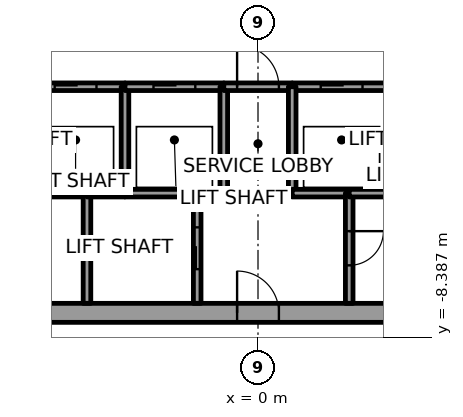
"""IFC4 building model, lengths in metres.
Left out: names, types, materials, properties, quantities, classifications, styles, units other than length and angle.
Written with IfcOpenShell. Run it as: python <this file> out.ifc"""

import sys

from ifc_helpers import new_model, si_unit, direction, frame, frame_2d, origin, place, context, subcontext, project, spatial, rectangle, extrude, element, fill, save


model = new_model("IFC4")
c1 = context("Model", 3, precision=1e-05, world=origin(), true_north=direction((0.0, 1.0)))
c2 = subcontext(c1, "Body", "Model", "MODEL_VIEW")
j1 = project(units=[si_unit("LENGTHUNIT", "METRE"), si_unit("PLANEANGLEUNIT", "RADIAN")], contexts=[c1])
p1 = place(None, origin())
s1 = spatial("IfcSite", under=j1, at=p1, CompositionType="ELEMENT")
p2 = place(p1, origin())
s2 = spatial("IfcBuilding", under=s1, at=p2, CompositionType="ELEMENT")
p3 = place(p2, frame((0.0, 0.0, 181.8)))
s3 = spatial("IfcBuildingStorey", under=s2, at=p3, CompositionType="ELEMENT", Elevation=181.8)
p4 = place(p3, frame((-11.0, -7.75, 0.0), z_axis=(0.0, 0.0, 1.0), x_axis=(1.0, 0.0, 0.0)))
e1 = element("IfcWall", 1, at=p4, inside=s3, PredefinedType="SHEAR", context=c2, shape_type="SweptSolid", body=[
    extrude(rectangle(XDim=22.0, YDim=0.5, at=frame_2d((11.0, 0.0))), origin(), (0.0, 0.0, 1.0), 4.0),
])
p5 = place(p4, frame((10.45, 0.0, 0.0)))
e2 = element("IfcOpeningElement", 2, at=p5, cuts=e1, PredefinedType="OPENING", context=c2, shape_type="SweptSolid", body=[
    extrude(rectangle(XDim=1.1, YDim=2.1, at=frame_2d((0.55, 1.05))), frame((0.0, 0.25, 0.0), z_axis=(0.0, -1.0, 0.0), x_axis=(1.0, 0.0, 0.0)), (0.0, 0.0, 1.0), 0.5),
])
p6 = place(p3, frame((-6.1, -4.6, 0.0), z_axis=(0.0, 0.0, 1.0), x_axis=(1.0, 0.0, 0.0)))
e3 = element("IfcWall", 3, at=p6, inside=s3, PredefinedType="SOLIDWALL", context=c2, shape_type="SweptSolid", body=[
    extrude(rectangle(XDim=1.6, YDim=0.2, at=frame_2d((0.8, 0.0))), origin(), (0.0, 0.0, 1.0), 3.85),
])
p7 = place(p3, frame((-6.1, -1.8, 0.0), z_axis=(0.0, 0.0, 1.0), x_axis=(1.0, 0.0, 0.0)))
e4 = element("IfcWall", 4, at=p7, inside=s3, PredefinedType="SOLIDWALL", context=c2, shape_type="SweptSolid", body=[
    extrude(rectangle(XDim=2.6, YDim=0.2, at=frame_2d((1.3, 0.0))), origin(), (0.0, 0.0, 1.0), 3.85),
])
p8 = place(p7, frame((0.75, 0.0, 0.0)))
e5 = element("IfcOpeningElement", 5, at=p8, cuts=e4, PredefinedType="OPENING", context=c2, shape_type="SweptSolid", body=[
    extrude(rectangle(XDim=1.1, YDim=2.1, at=frame_2d((0.55, 1.05))), frame((0.0, 0.1, 0.0), z_axis=(0.0, -1.0, 0.0), x_axis=(1.0, 0.0, 0.0)), (0.0, 0.0, 1.0), 0.2),
])
p9 = place(p3, frame((-4.5, -4.6, 0.0), z_axis=(0.0, 0.0, 1.0), x_axis=(0.0, -1.0, 0.0)))
e6 = element("IfcWall", 6, at=p9, inside=s3, PredefinedType="SOLIDWALL", context=c2, shape_type="SweptSolid", body=[
    extrude(rectangle(XDim=2.9, YDim=0.2, at=frame_2d((1.45, 0.0))), origin(), (0.0, 0.0, 1.0), 3.85),
])
p10 = place(p3, frame((-4.5, -4.6, 0.0), z_axis=(0.0, 0.0, 1.0), x_axis=(1.0, 0.0, 0.0)))
e7 = element("IfcWall", 7, at=p10, inside=s3, PredefinedType="SOLIDWALL", context=c2, shape_type="SweptSolid", body=[
    extrude(rectangle(XDim=1.0, YDim=0.2, at=frame_2d((0.5, 0.0))), origin(), (0.0, 0.0, 1.0), 3.85),
])
p11 = place(p3, frame((-3.5, -4.6, 0.0), z_axis=(0.0, 0.0, 1.0), x_axis=(1.0, 0.0, 0.0)))
e8 = element("IfcWall", 8, at=p11, inside=s3, PredefinedType="SOLIDWALL", context=c2, shape_type="SweptSolid", body=[
    extrude(rectangle(XDim=1.9, YDim=0.2, at=frame_2d((0.95, 0.0))), origin(), (0.0, 0.0, 1.0), 3.85),
])
p12 = place(p3, frame((-3.5, -4.6, 0.0), z_axis=(0.0, 0.0, 1.0), x_axis=(0.0, 1.0, 0.0)))
e9 = element("IfcWall", 9, at=p12, inside=s3, PredefinedType="SOLIDWALL", context=c2, shape_type="SweptSolid", body=[
    extrude(rectangle(XDim=2.8, YDim=0.2, at=frame_2d((1.4, 0.0))), origin(), (0.0, 0.0, 1.0), 3.85),
])
p13 = place(p3, frame((-3.5, -1.8, 0.0), z_axis=(0.0, 0.0, 1.0), x_axis=(1.0, 0.0, 0.0)))
e10 = element("IfcWall", 10, at=p13, inside=s3, PredefinedType="SOLIDWALL", context=c2, shape_type="SweptSolid", body=[
    extrude(rectangle(XDim=2.6, YDim=0.2, at=frame_2d((1.3, 0.0))), origin(), (0.0, 0.0, 1.0), 3.85),
])
p14 = place(p13, frame((0.75, 0.0, 0.0)))
e11 = element("IfcOpeningElement", 11, at=p14, cuts=e10, PredefinedType="OPENING", context=c2, shape_type="SweptSolid", body=[
    extrude(rectangle(XDim=1.1, YDim=2.1, at=frame_2d((0.55, 1.05))), frame((0.0, 0.1, 0.0), z_axis=(0.0, -1.0, 0.0), x_axis=(1.0, 0.0, 0.0)), (0.0, 0.0, 1.0), 0.2),
])
p15 = place(p3, frame((-1.6, -7.5, 0.0), z_axis=(0.0, 0.0, 1.0), x_axis=(0.0, 1.0, 0.0)))
e12 = element("IfcWall", 12, at=p15, inside=s3, PredefinedType="SOLIDWALL", context=c2, shape_type="SweptSolid", body=[
    extrude(rectangle(XDim=2.9, YDim=0.2, at=frame_2d((1.45, 0.0))), origin(), (0.0, 0.0, 1.0), 3.85),
])
p16 = place(p15, frame((0.9, 0.0, 0.0)))
e13 = element("IfcOpeningElement", 13, at=p16, cuts=e12, PredefinedType="OPENING", context=c2, shape_type="SweptSolid", body=[
    extrude(rectangle(XDim=1.1, YDim=2.1, at=frame_2d((0.55, 1.05))), frame((0.0, 0.1, 0.0), z_axis=(0.0, -1.0, 0.0), x_axis=(1.0, 0.0, 0.0)), (0.0, 0.0, 1.0), 0.2),
])
p17 = place(p3, frame((-1.6, -4.6, 0.0), z_axis=(0.0, 0.0, 1.0), x_axis=(1.0, 0.0, 0.0)))
e14 = element("IfcWall", 14, at=p17, inside=s3, PredefinedType="SOLIDWALL", context=c2, shape_type="SweptSolid", body=[
    extrude(rectangle(XDim=0.7, YDim=0.2, at=frame_2d((0.35, 0.0))), origin(), (0.0, 0.0, 1.0), 3.85),
])
p18 = place(p3, frame((-0.9, -4.6, 0.0), z_axis=(0.0, 0.0, 1.0), x_axis=(0.0, 1.0, 0.0)))
e15 = element("IfcWall", 15, at=p18, inside=s3, PredefinedType="SOLIDWALL", context=c2, shape_type="SweptSolid", body=[
    extrude(rectangle(XDim=2.8, YDim=0.2, at=frame_2d((1.4, 0.0))), origin(), (0.0, 0.0, 1.0), 3.85),
])
p19 = place(p3, frame((-0.9, -1.8, 0.0), z_axis=(0.0, 0.0, 1.0), x_axis=(1.0, 0.0, 0.0)))
e16 = element("IfcWall", 16, at=p19, inside=s3, PredefinedType="SOLIDWALL", context=c2, shape_type="SweptSolid", body=[
    extrude(rectangle(XDim=1.8, YDim=0.2, at=frame_2d((0.9, 0.0))), origin(), (0.0, 0.0, 1.0), 3.85),
])
p20 = place(p19, frame((0.35, 0.0, 0.0)))
e17 = element("IfcOpeningElement", 17, at=p20, cuts=e16, PredefinedType="OPENING", context=c2, shape_type="SweptSolid", body=[
    extrude(rectangle(XDim=1.1, YDim=2.1, at=frame_2d((0.55, 1.05))), frame((0.0, 0.1, 0.0), z_axis=(0.0, -1.0, 0.0), x_axis=(1.0, 0.0, 0.0)), (0.0, 0.0, 1.0), 0.2),
])
p21 = place(p3, frame((0.9, -1.8, 0.0), z_axis=(0.0, 0.0, 1.0), x_axis=(1.0, 0.0, 0.0)))
e18 = element("IfcWall", 18, at=p21, inside=s3, PredefinedType="SOLIDWALL", context=c2, shape_type="SweptSolid", body=[
    extrude(rectangle(XDim=2.6, YDim=0.2, at=frame_2d((1.3, 0.0))), origin(), (0.0, 0.0, 1.0), 3.85),
])
p22 = place(p21, frame((0.75, 0.0, 0.0)))
e19 = element("IfcOpeningElement", 19, at=p22, cuts=e18, PredefinedType="OPENING", context=c2, shape_type="SweptSolid", body=[
    extrude(rectangle(XDim=1.1, YDim=2.1, at=frame_2d((0.55, 1.05))), frame((0.0, 0.1, 0.0), z_axis=(0.0, -1.0, 0.0), x_axis=(1.0, 0.0, 0.0)), (0.0, 0.0, 1.0), 0.2),
])
p23 = place(p3, frame((0.9, -1.8, 0.0), z_axis=(0.0, 0.0, 1.0), x_axis=(0.0, -1.0, 0.0)))
e20 = element("IfcWall", 20, at=p23, inside=s3, PredefinedType="SOLIDWALL", context=c2, shape_type="SweptSolid", body=[
    extrude(rectangle(XDim=2.8, YDim=0.2, at=frame_2d((1.4, 0.0))), origin(), (0.0, 0.0, 1.0), 3.85),
])
p24 = place(p3, frame((0.9, -4.6, 0.0), z_axis=(0.0, 0.0, 1.0), x_axis=(1.0, 0.0, 0.0)))
e21 = element("IfcWall", 21, at=p24, inside=s3, PredefinedType="SOLIDWALL", context=c2, shape_type="SweptSolid", body=[
    extrude(rectangle(XDim=1.5, YDim=0.2, at=frame_2d((0.75, 0.0))), origin(), (0.0, 0.0, 1.0), 3.85),
])
p25 = place(p3, frame((2.4, -4.6, 0.0), z_axis=(0.0, 0.0, 1.0), x_axis=(0.0, -1.0, 0.0)))
e22 = element("IfcWall", 22, at=p25, inside=s3, PredefinedType="SOLIDWALL", context=c2, shape_type="SweptSolid", body=[
    extrude(rectangle(XDim=2.9, YDim=0.2, at=frame_2d((1.45, 0.0))), origin(), (0.0, 0.0, 1.0), 3.85),
])
p26 = place(p25, frame((1.0, 0.0, 0.0)))
e23 = element("IfcOpeningElement", 23, at=p26, cuts=e22, PredefinedType="OPENING", context=c2, shape_type="SweptSolid", body=[
    extrude(rectangle(XDim=0.9, YDim=2.1, at=frame_2d((0.45, 1.05))), frame((0.0, 0.1, 0.0), z_axis=(0.0, -1.0, 0.0), x_axis=(1.0, 0.0, 0.0)), (0.0, 0.0, 1.0), 0.2),
])
p27 = place(p3, frame((3.5, -4.6, 0.0), z_axis=(0.0, 0.0, 1.0), x_axis=(-1.0, 0.0, 0.0)))
e24 = element("IfcWall", 24, at=p27, inside=s3, PredefinedType="SOLIDWALL", context=c2, shape_type="SweptSolid", body=[
    extrude(rectangle(XDim=1.1, YDim=0.2, at=frame_2d((0.55, 0.0))), origin(), (0.0, 0.0, 1.0), 3.85),
])
p28 = place(p8, origin())
e25 = element("IfcDoor", 25, at=p28, inside=s3, OperationType="SLIDING_TO_LEFT", PredefinedType="DOOR", context=c2, shape_type="SweptSolid", body=[
    extrude(rectangle(XDim=1.1, YDim=2.1, at=frame_2d((0.55, 1.05))), frame((0.0, 0.025, 0.0), z_axis=(0.0, -1.0, 0.0), x_axis=(1.0, 0.0, 0.0)), (0.0, 0.0, 1.0), 0.05),
])
fill(e5, e25)
p29 = place(p14, origin())
e26 = element("IfcDoor", 26, at=p29, inside=s3, OperationType="SLIDING_TO_RIGHT", PredefinedType="DOOR", context=c2, shape_type="SweptSolid", body=[
    extrude(rectangle(XDim=1.1, YDim=2.1, at=frame_2d((0.55, 1.05))), frame((0.0, 0.025, 0.0), z_axis=(0.0, -1.0, 0.0), x_axis=(1.0, 0.0, 0.0)), (0.0, 0.0, 1.0), 0.05),
])
fill(e11, e26)
p30 = place(p22, origin())
e27 = element("IfcDoor", 27, at=p30, inside=s3, OperationType="SLIDING_TO_LEFT", PredefinedType="DOOR", context=c2, shape_type="SweptSolid", body=[
    extrude(rectangle(XDim=1.1, YDim=2.1, at=frame_2d((0.55, 1.05))), frame((0.0, 0.025, 0.0), z_axis=(0.0, -1.0, 0.0), x_axis=(1.0, 0.0, 0.0)), (0.0, 0.0, 1.0), 0.05),
])
fill(e19, e27)
p31 = place(p16, origin())
e28 = element("IfcDoor", 28, at=p31, inside=s3, OperationType="SLIDING_TO_LEFT", PredefinedType="DOOR", context=c2, shape_type="SweptSolid", body=[
    extrude(rectangle(XDim=1.1, YDim=2.1, at=frame_2d((0.55, 1.05))), frame((0.0, 0.025, 0.0), z_axis=(0.0, -1.0, 0.0), x_axis=(1.0, 0.0, 0.0)), (0.0, 0.0, 1.0), 0.05),
])
fill(e13, e28)
p32 = place(p20, origin())
e29 = element("IfcDoor", 29, at=p32, inside=s3, OperationType="SINGLE_SWING_LEFT", PredefinedType="DOOR", context=c2, shape_type="SweptSolid", body=[
    extrude(rectangle(XDim=1.1, YDim=2.1, at=frame_2d((0.55, 1.05))), frame((0.0, 0.025, 0.0), z_axis=(0.0, -1.0, 0.0), x_axis=(1.0, 0.0, 0.0)), (0.0, 0.0, 1.0), 0.05),
])
fill(e17, e29)
p33 = place(p26, origin())
e30 = element("IfcDoor", 30, at=p33, inside=s3, OperationType="SINGLE_SWING_LEFT", PredefinedType="DOOR", context=c2, shape_type="SweptSolid", body=[
    extrude(rectangle(XDim=0.9, YDim=2.1, at=frame_2d((0.45, 1.05))), frame((0.0, 0.025, 0.0), z_axis=(0.0, -1.0, 0.0), x_axis=(1.0, 0.0, 0.0)), (0.0, 0.0, 1.0), 0.05),
])
fill(e23, e30)
p34 = place(p5, origin())
e31 = element("IfcDoor", 31, at=p34, inside=s3, OperationType="SINGLE_SWING_LEFT", PredefinedType="DOOR", context=c2, shape_type="SweptSolid", body=[
    extrude(rectangle(XDim=1.1, YDim=2.1, at=frame_2d((0.55, 1.05))), frame((0.0, 0.025, 0.0), z_axis=(0.0, -1.0, 0.0), x_axis=(1.0, 0.0, 0.0)), (0.0, 0.0, 1.0), 0.05),
])
fill(e2, e31)
save(model, sys.argv[1])
